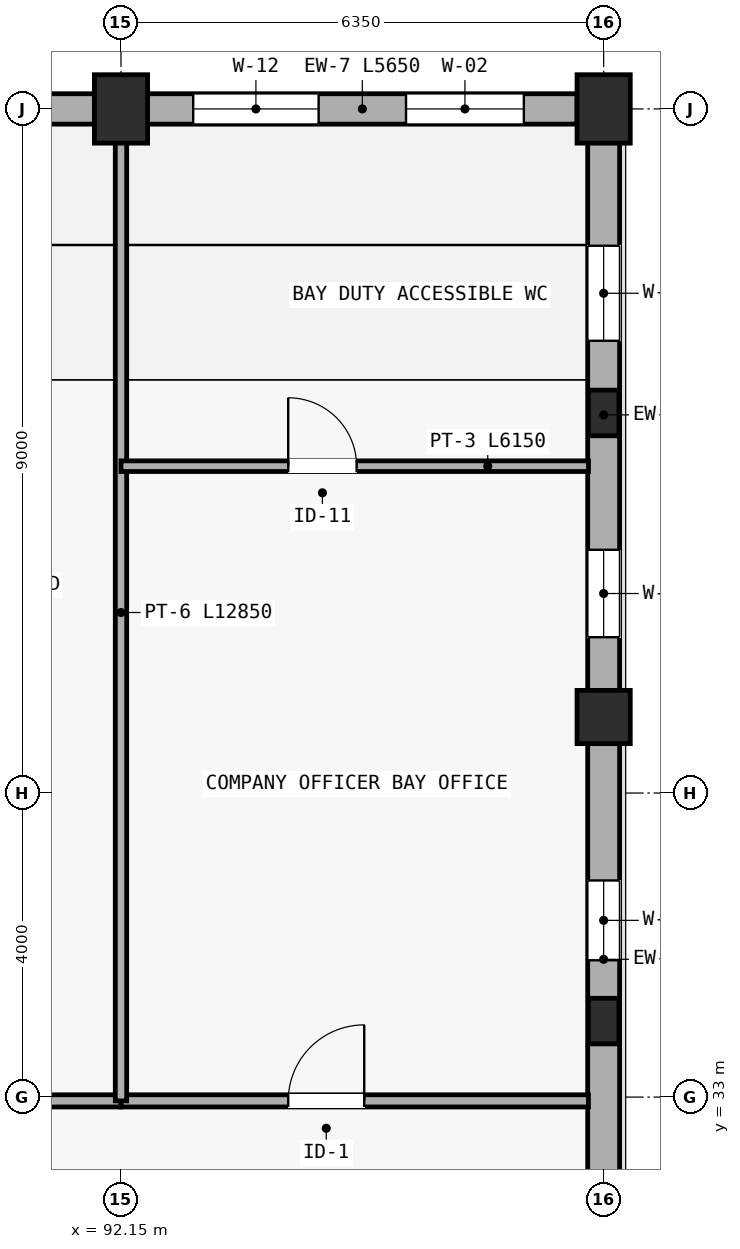
"""IFC4 building model, lengths in metres.
Left out: names, types, materials, properties, quantities, classifications, styles, units other than length and angle.
Written with IfcOpenShell. Run it as: python <this file> out.ifc"""

import sys

from ifc_helpers import new_model, si_unit, direction, frame, frame_2d, origin, origin_2d, place, context, subcontext, project, spatial, rectangle, extrude, element, fill, save


model = new_model("IFC4")
c1 = context("Model", 3, precision=1e-05, world=origin(), true_north=direction((0.0, 1.0)))
c2 = subcontext(c1, "Body", "Model", "MODEL_VIEW")
j1 = project(units=[si_unit("LENGTHUNIT", "METRE"), si_unit("PLANEANGLEUNIT", "RADIAN")], contexts=[c1])
p1 = place(None, origin())
s1 = spatial("IfcSite", under=j1, at=p1, CompositionType="ELEMENT")
p2 = place(p1, origin())
s2 = spatial("IfcBuilding", under=s1, at=p2, CompositionType="ELEMENT")
p3 = place(p2, origin())
s3 = spatial("IfcBuildingStorey", under=s2, at=p3, CompositionType="ELEMENT", Elevation=0.0)
for number, where, z_axis, x_axis in (
    (1, (92.15, 46.0, 0.0), (0.0, 0.0, 1.0), (1.0, 0.0, 0.0)),
    (2, (98.5, 46.0, 0.0), (0.0, 0.0, 1.0), (1.0, 0.0, 0.0)),
):
    element("IfcColumn", number, at=place(p3, frame(where, z_axis=z_axis, x_axis=x_axis)), inside=s3, PredefinedType="COLUMN", context=c2, shape_type="SweptSolid", body=[
        extrude(rectangle(XDim=0.7, YDim=0.9, at=origin_2d()), origin(), (0.0, 0.0, 1.0), 5.65),
    ])
p4 = place(p3, frame((98.5, 38.0, 0.0), z_axis=(0.0, 0.0, 1.0), x_axis=(1.0, 0.0, 0.0)))
e3 = element("IfcColumn", 3, at=p4, inside=s3, PredefinedType="COLUMN", context=c2, shape_type="SweptSolid", body=[
    extrude(rectangle(XDim=0.7, YDim=0.7, at=origin_2d()), origin(), (0.0, 0.0, 1.0), 5.85),
])
for number, where, z_axis, x_axis in (
    (4, (98.5, 34.0, 0.0), (0.0, 0.0, 1.0), (1.0, 0.0, 0.0)),
    (5, (98.5, 42.0, 0.0), (0.0, 0.0, 1.0), (1.0, 0.0, 0.0)),
):
    element("IfcColumn", number, at=place(p3, frame(where, z_axis=z_axis, x_axis=x_axis)), inside=s3, PredefinedType="PILASTER", context=c2, shape_type="SweptSolid", body=[
        extrude(rectangle(XDim=0.4, YDim=0.6, at=origin_2d()), origin(), (0.0, 0.0, 1.0), 5.85),
    ])
p5 = place(p3, frame((91.8, 46.0, 0.0), z_axis=(0.0, 0.0, 1.0), x_axis=(-1.0, 0.0, 0.0)))
e6 = element("IfcWall", 6, at=p5, inside=s3, PredefinedType="STANDARD", context=c2, shape_type="SweptSolid", body=[
    extrude(rectangle(XDim=5.65, YDim=0.4, at=frame_2d((2.825, 0.0))), origin(), (0.0, 0.0, 1.0), 3.8),
])
p6 = place(p5, frame((0.7, 0.0, 0.95)))
e7 = element("IfcOpeningElement", 7, at=p6, cuts=e6, PredefinedType="OPENING", context=c2, shape_type="SweptSolid", body=[
    extrude(rectangle(XDim=1.55, YDim=1.55, at=frame_2d((0.775, 0.775))), frame((0.0, 0.21, 0.0), z_axis=(0.0, -1.0, 0.0), x_axis=(1.0, 0.0, 0.0)), (0.0, 0.0, 1.0), 0.42),
])
p7 = place(p5, frame((3.4, 0.0, 0.95)))
e8 = element("IfcOpeningElement", 8, at=p7, cuts=e6, PredefinedType="OPENING", context=c2, shape_type="SweptSolid", body=[
    extrude(rectangle(XDim=1.65, YDim=1.45, at=frame_2d((0.825, 0.725))), frame((0.0, 0.21, 0.0), z_axis=(0.0, -1.0, 0.0), x_axis=(1.0, 0.0, 0.0)), (0.0, 0.0, 1.0), 0.42),
])
p8 = place(p3, frame((98.15, 46.0, 0.0), z_axis=(0.0, 0.0, 1.0), x_axis=(-1.0, 0.0, 0.0)))
e9 = element("IfcWall", 9, at=p8, inside=s3, PredefinedType="STANDARD", context=c2, shape_type="SweptSolid", body=[
    extrude(rectangle(XDim=5.65, YDim=0.4, at=frame_2d((2.825, 0.0))), origin(), (0.0, 0.0, 1.0), 3.8),
])
p9 = place(p8, frame((0.7, 0.0, 0.95)))
e10 = element("IfcOpeningElement", 10, at=p9, cuts=e9, PredefinedType="OPENING", context=c2, shape_type="SweptSolid", body=[
    extrude(rectangle(XDim=1.55, YDim=1.55, at=frame_2d((0.775, 0.775))), frame((0.0, 0.21, 0.0), z_axis=(0.0, -1.0, 0.0), x_axis=(1.0, 0.0, 0.0)), (0.0, 0.0, 1.0), 0.42),
])
p10 = place(p8, frame((3.4, 0.0, 0.95)))
e11 = element("IfcOpeningElement", 11, at=p10, cuts=e9, PredefinedType="OPENING", context=c2, shape_type="SweptSolid", body=[
    extrude(rectangle(XDim=1.65, YDim=1.45, at=frame_2d((0.825, 0.725))), frame((0.0, 0.21, 0.0), z_axis=(0.0, -1.0, 0.0), x_axis=(1.0, 0.0, 0.0)), (0.0, 0.0, 1.0), 0.42),
])
p11 = place(p3, frame((98.5, 29.35, 0.0), z_axis=(0.0, 0.0, 1.0), x_axis=(0.0, 1.0, 0.0)))
e12 = element("IfcWall", 12, at=p11, inside=s3, PredefinedType="STANDARD", context=c2, shape_type="SweptSolid", body=[
    extrude(rectangle(XDim=8.3, YDim=0.42, at=frame_2d((4.15, 0.0))), origin(), (0.0, 0.0, 1.0), 3.928),
])
p12 = place(p11, frame((0.9, 0.0, 0.0)))
e13 = element("IfcOpeningElement", 13, at=p12, cuts=e12, PredefinedType="OPENING", context=c2, shape_type="SweptSolid", body=[
    extrude(rectangle(XDim=1.75, YDim=2.2, at=frame_2d((0.875, 1.1))), frame((0.0, 0.22, 0.0), z_axis=(0.0, -1.0, 0.0), x_axis=(1.0, 0.0, 0.0)), (0.0, 0.0, 1.0), 0.44),
])
p13 = place(p11, frame((5.45, 0.0, 1.0)))
e14 = element("IfcOpeningElement", 14, at=p13, cuts=e12, PredefinedType="OPENING", context=c2, shape_type="SweptSolid", body=[
    extrude(rectangle(XDim=1.05, YDim=1.4, at=frame_2d((0.525, 0.7))), frame((0.0, 0.22, 0.0), z_axis=(0.0, -1.0, 0.0), x_axis=(1.0, 0.0, 0.0)), (0.0, 0.0, 1.0), 0.44),
])
p14 = place(p3, frame((98.5, 38.35, 0.0), z_axis=(0.0, 0.0, 1.0), x_axis=(0.0, 1.0, 0.0)))
e15 = element("IfcWall", 15, at=p14, inside=s3, PredefinedType="STANDARD", context=c2, shape_type="SweptSolid", body=[
    extrude(rectangle(XDim=7.25, YDim=0.42, at=frame_2d((3.625, 0.0))), origin(), (0.0, 0.0, 1.0), 3.928),
])
p15 = place(p14, frame((0.7, 0.0, 1.05)))
e16 = element("IfcOpeningElement", 16, at=p15, cuts=e15, PredefinedType="OPENING", context=c2, shape_type="SweptSolid", body=[
    extrude(rectangle(XDim=1.15, YDim=1.45, at=frame_2d((0.575, 0.725))), frame((0.0, 0.22, 0.0), z_axis=(0.0, -1.0, 0.0), x_axis=(1.0, 0.0, 0.0)), (0.0, 0.0, 1.0), 0.44),
])
p16 = place(p14, frame((4.6, 0.0, 1.05)))
e17 = element("IfcOpeningElement", 17, at=p16, cuts=e15, PredefinedType="OPENING", context=c2, shape_type="SweptSolid", body=[
    extrude(rectangle(XDim=1.25, YDim=1.5, at=frame_2d((0.625, 0.75))), frame((0.0, 0.22, 0.0), z_axis=(0.0, -1.0, 0.0), x_axis=(1.0, 0.0, 0.0)), (0.0, 0.0, 1.0), 0.44),
])
p17 = place(p3, frame((85.8, 32.95, 0.0), z_axis=(0.0, 0.0, 1.0), x_axis=(1.0, 0.0, 0.0)))
e18 = element("IfcWall", 18, at=p17, inside=s3, PredefinedType="PARTITIONING", context=c2, shape_type="SweptSolid", body=[
    extrude(rectangle(XDim=6.35, YDim=0.16, at=frame_2d((3.175, 0.0))), origin(), (0.0, 0.0, 1.0), 4.4),
])
p18 = place(p17, frame((2.2, 0.0, 0.0)))
e19 = element("IfcOpeningElement", 19, at=p18, cuts=e18, PredefinedType="OPENING", context=c2, shape_type="SweptSolid", body=[
    extrude(rectangle(XDim=1.02, YDim=2.14, at=frame_2d((0.51, 1.07))), frame((0.0, 0.09, 0.0), z_axis=(0.0, -1.0, 0.0), x_axis=(1.0, 0.0, 0.0)), (0.0, 0.0, 1.0), 0.18),
])
p19 = place(p3, frame((92.15, 32.95, 0.0), z_axis=(0.0, 0.0, 1.0), x_axis=(1.0, 0.0, 0.0)))
e20 = element("IfcWall", 20, at=p19, inside=s3, PredefinedType="PARTITIONING", context=c2, shape_type="SweptSolid", body=[
    extrude(rectangle(XDim=6.15, YDim=0.16, at=frame_2d((3.075, 0.0))), origin(), (0.0, 0.0, 1.0), 4.4),
])
p20 = place(p19, frame((2.2, 0.0, 0.0)))
e21 = element("IfcOpeningElement", 21, at=p20, cuts=e20, PredefinedType="OPENING", context=c2, shape_type="SweptSolid", body=[
    extrude(rectangle(XDim=1.0, YDim=2.12, at=frame_2d((0.5, 1.06))), frame((0.0, 0.09, 0.0), z_axis=(0.0, -1.0, 0.0), x_axis=(1.0, 0.0, 0.0)), (0.0, 0.0, 1.0), 0.18),
])
p21 = place(p3, frame((92.15, 32.95, 0.0), z_axis=(0.0, 0.0, 1.0), x_axis=(0.0, 1.0, 0.0)))
e22 = element("IfcWall", 22, at=p21, inside=s3, PredefinedType="PARTITIONING", context=c2, shape_type="SweptSolid", body=[
    extrude(rectangle(XDim=12.85, YDim=0.15, at=frame_2d((6.425, 0.0))), origin(), (0.0, 0.0, 1.0), 3.928),
])
p22 = place(p3, frame((92.15, 41.3, 0.0), z_axis=(0.0, 0.0, 1.0), x_axis=(1.0, 0.0, 0.0)))
e23 = element("IfcWall", 23, at=p22, inside=s3, PredefinedType="PARTITIONING", context=c2, shape_type="SweptSolid", body=[
    extrude(rectangle(XDim=6.15, YDim=0.14, at=frame_2d((3.075, 0.0))), origin(), (0.0, 0.0, 1.0), 4.4),
])
p23 = place(p22, frame((2.2, 0.0, 0.0)))
e24 = element("IfcOpeningElement", 24, at=p23, cuts=e23, PredefinedType="OPENING", context=c2, shape_type="SweptSolid", body=[
    extrude(rectangle(XDim=0.9, YDim=2.08, at=frame_2d((0.45, 1.04))), frame((0.0, 0.08, 0.0), z_axis=(0.0, -1.0, 0.0), x_axis=(1.0, 0.0, 0.0)), (0.0, 0.0, 1.0), 0.16),
])
p24 = place(p9, origin())
e25 = element("IfcWindow", 25, at=p24, inside=s3, PartitioningType="DOUBLE_PANEL_VERTICAL", PredefinedType="WINDOW", context=c2, shape_type="SweptSolid", body=[
    extrude(rectangle(XDim=1.55, YDim=1.55, at=frame_2d((0.775, 0.775))), frame((0.0, 0.03, 0.0), z_axis=(0.0, -1.0, 0.0), x_axis=(1.0, 0.0, 0.0)), (0.0, 0.0, 1.0), 0.06),
])
fill(e10, e25)
p25 = place(p10, origin())
e26 = element("IfcWindow", 26, at=p25, inside=s3, PartitioningType="DOUBLE_PANEL_VERTICAL", PredefinedType="WINDOW", context=c2, shape_type="SweptSolid", body=[
    extrude(rectangle(XDim=1.65, YDim=1.45, at=frame_2d((0.825, 0.725))), frame((0.0, 0.03, 0.0), z_axis=(0.0, -1.0, 0.0), x_axis=(1.0, 0.0, 0.0)), (0.0, 0.0, 1.0), 0.06),
])
fill(e11, e26)
p26 = place(p13, origin())
e27 = element("IfcWindow", 27, at=p26, inside=s3, PartitioningType="SINGLE_PANEL", PredefinedType="WINDOW", context=c2, shape_type="SweptSolid", body=[
    extrude(rectangle(XDim=1.05, YDim=1.4, at=frame_2d((0.525, 0.7))), frame((0.0, 0.03, 0.0), z_axis=(0.0, -1.0, 0.0), x_axis=(1.0, 0.0, 0.0)), (0.0, 0.0, 1.0), 0.06),
])
fill(e14, e27)
p27 = place(p15, origin())
e28 = element("IfcWindow", 28, at=p27, inside=s3, PartitioningType="SINGLE_PANEL", PredefinedType="WINDOW", context=c2, shape_type="SweptSolid", body=[
    extrude(rectangle(XDim=1.15, YDim=1.45, at=frame_2d((0.575, 0.725))), frame((0.0, 0.03, 0.0), z_axis=(0.0, -1.0, 0.0), x_axis=(1.0, 0.0, 0.0)), (0.0, 0.0, 1.0), 0.06),
])
fill(e16, e28)
p28 = place(p16, origin())
e29 = element("IfcWindow", 29, at=p28, inside=s3, PartitioningType="SINGLE_PANEL", PredefinedType="WINDOW", context=c2, shape_type="SweptSolid", body=[
    extrude(rectangle(XDim=1.25, YDim=1.5, at=frame_2d((0.625, 0.75))), frame((0.0, 0.03, 0.0), z_axis=(0.0, -1.0, 0.0), x_axis=(1.0, 0.0, 0.0)), (0.0, 0.0, 1.0), 0.06),
])
fill(e17, e29)
p29 = place(p20, origin())
e30 = element("IfcDoor", 30, at=p29, inside=s3, OperationType="SINGLE_SWING_RIGHT", PredefinedType="DOOR", context=c2, shape_type="SweptSolid", body=[
    extrude(rectangle(XDim=1.0, YDim=2.12, at=frame_2d((0.5, 1.06))), frame((0.0, 0.025, 0.0), z_axis=(0.0, -1.0, 0.0), x_axis=(1.0, 0.0, 0.0)), (0.0, 0.0, 1.0), 0.05),
])
fill(e21, e30)
p30 = place(p23, origin())
e31 = element("IfcDoor", 31, at=p30, inside=s3, OperationType="SINGLE_SWING_LEFT", PredefinedType="DOOR", context=c2, shape_type="SweptSolid", body=[
    extrude(rectangle(XDim=0.9, YDim=2.08, at=frame_2d((0.45, 1.04))), frame((0.0, 0.025, 0.0), z_axis=(0.0, -1.0, 0.0), x_axis=(1.0, 0.0, 0.0)), (0.0, 0.0, 1.0), 0.05),
])
fill(e24, e31)
save(model, sys.argv[1])
